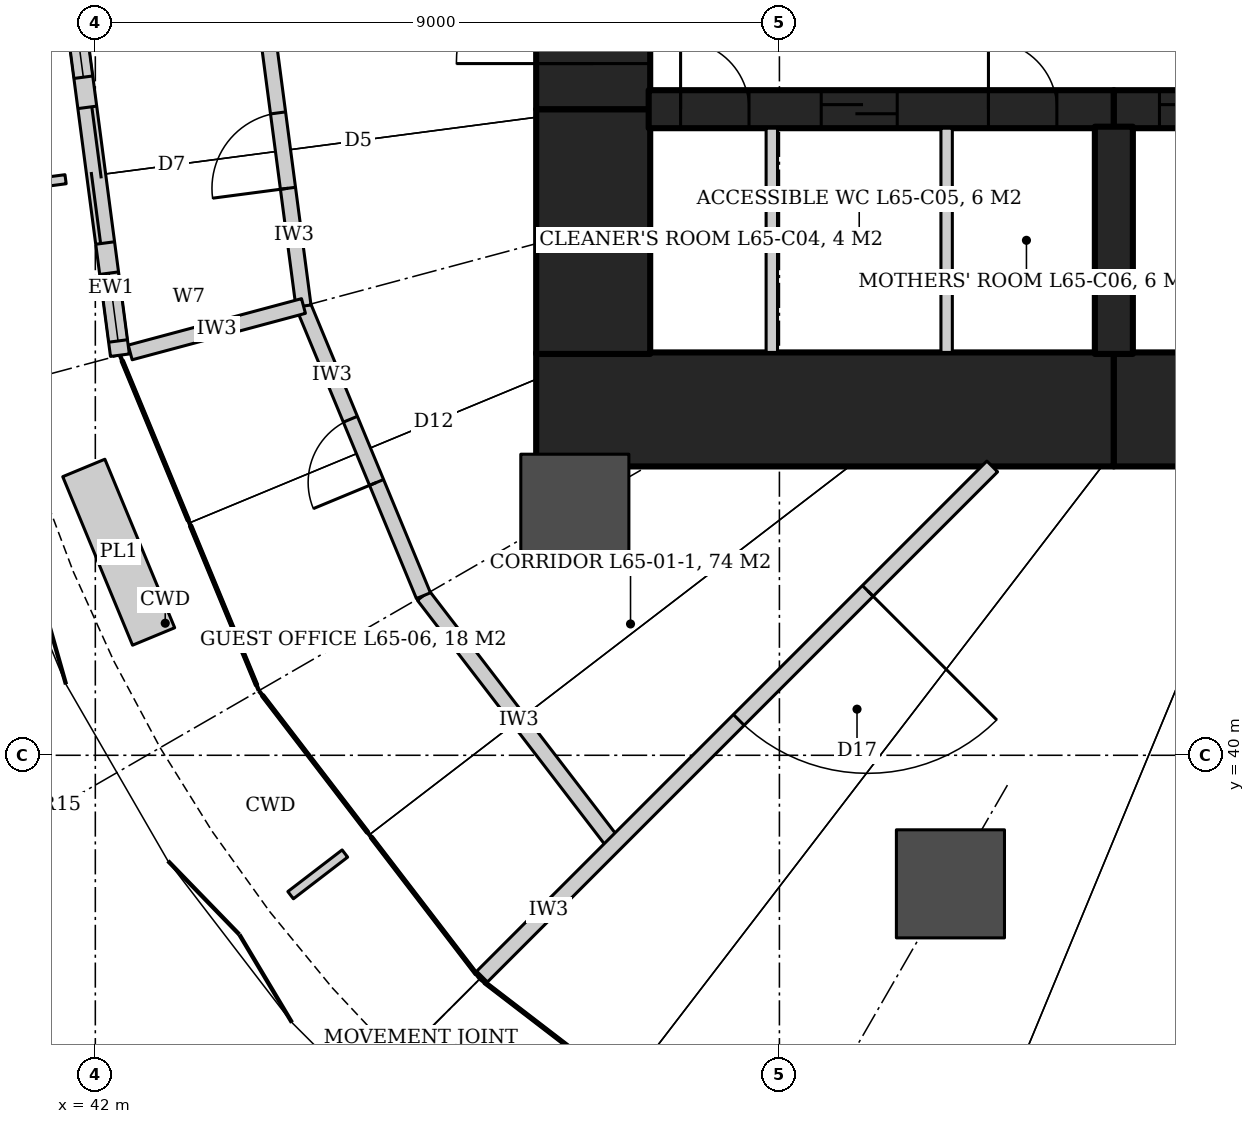
"""IFC4 building model, lengths in metres.
Left out: names, types, materials, properties, quantities, classifications, styles, units other than length and angle.
Written with IfcOpenShell. Run it as: python <this file> out.ifc"""

import sys

from ifc_helpers import new_model, si_unit, direction, frame, frame_2d, origin, origin_2d, place, context, subcontext, project, spatial, rectangle, hollow_circle, extrude, element, fill, save


model = new_model("IFC4")
c1 = context("Model", 3, precision=1e-05, world=origin(), true_north=direction((0.0, 1.0)))
c2 = subcontext(c1, "Body", "Model", "MODEL_VIEW")
j1 = project(units=[si_unit("LENGTHUNIT", "METRE"), si_unit("PLANEANGLEUNIT", "RADIAN")], contexts=[c1])
p1 = place(None, origin())
s1 = spatial("IfcSite", under=j1, at=p1, CompositionType="ELEMENT")
p2 = place(p1, origin())
s2 = spatial("IfcBuilding", under=s1, at=p2, CompositionType="ELEMENT")
p3 = place(p2, frame((0.0, 0.0, 278.0)))
s3 = spatial("IfcBuildingStorey", under=s2, at=p3, CompositionType="ELEMENT", Elevation=278.0)
p4 = place(p3, frame((47.8, 44.55, 0.0), z_axis=(0.0, 0.0, 1.0), x_axis=(1.0, 0.0, 0.0)))
e1 = element("IfcWall", 1, at=p4, inside=s3, PredefinedType="SHEAR", context=c2, shape_type="SweptSolid", body=[
    extrude(rectangle(XDim=7.6, YDim=1.5, at=frame_2d((3.8, 0.0))), origin(), (0.0, 0.0, 1.0), 4.2),
])
p5 = place(p3, frame((55.4, 44.55, 0.0), z_axis=(0.0, 0.0, 1.0), x_axis=(1.0, 0.0, 0.0)))
e2 = element("IfcWall", 2, at=p5, inside=s3, PredefinedType="SHEAR", context=c2, shape_type="SweptSolid", body=[
    extrude(rectangle(XDim=9.2, YDim=1.5, at=frame_2d((4.6, 0.0))), origin(), (0.0, 0.0, 1.0), 4.2),
])
p6 = place(p3, frame((48.55, 45.28, 0.0), z_axis=(0.0, 0.0, 1.0), x_axis=(0.0, 1.0, 0.0)))
e3 = element("IfcWall", 3, at=p6, inside=s3, PredefinedType="SHEAR", context=c2, shape_type="SweptSolid", body=[
    extrude(rectangle(XDim=3.22, YDim=1.5, at=frame_2d((1.61, 0.0))), origin(), (0.0, 0.0, 1.0), 4.2),
])
p7 = place(p3, frame((48.55, 48.5, 0.0), z_axis=(0.0, 0.0, 1.0), x_axis=(0.0, 1.0, 0.0)))
e4 = element("IfcWall", 4, at=p7, inside=s3, PredefinedType="SHEAR", context=c2, shape_type="SweptSolid", body=[
    extrude(rectangle(XDim=3.0, YDim=1.5, at=frame_2d((1.5, 0.0))), origin(), (0.0, 0.0, 1.0), 4.2),
])
p8 = place(p7, frame((0.6, 0.0, 0.0)))
e5 = element("IfcOpeningElement", 5, at=p8, cuts=e4, PredefinedType="OPENING", context=c2, shape_type="SweptSolid", body=[
    extrude(rectangle(XDim=1.8, YDim=2.1, at=frame_2d((0.9, 1.05))), frame((0.0, 0.76, 0.0), z_axis=(0.0, -1.0, 0.0), x_axis=(1.0, 0.0, 0.0)), (0.0, 0.0, 1.0), 1.52),
])
p9 = place(p3, frame((49.28, 48.5, 0.0), z_axis=(0.0, 0.0, 1.0), x_axis=(1.0, 0.0, 0.0)))
e6 = element("IfcWall", 6, at=p9, inside=s3, PredefinedType="SHEAR", context=c2, shape_type="SweptSolid", body=[
    extrude(rectangle(XDim=6.12, YDim=0.5, at=frame_2d((3.06, 0.0))), origin(), (0.0, 0.0, 1.0), 4.2),
])
p10 = place(p9, frame((0.42, 0.0, 0.0)))
e7 = element("IfcOpeningElement", 7, at=p10, cuts=e6, PredefinedType="OPENING", context=c2, shape_type="SweptSolid", body=[
    extrude(rectangle(XDim=0.9, YDim=2.1, at=frame_2d((0.45, 1.05))), frame((0.0, 0.26, 0.0), z_axis=(0.0, -1.0, 0.0), x_axis=(1.0, 0.0, 0.0)), (0.0, 0.0, 1.0), 0.52),
])
p11 = place(p9, frame((2.27, 0.0, 0.0)))
e8 = element("IfcOpeningElement", 8, at=p11, cuts=e6, PredefinedType="OPENING", context=c2, shape_type="SweptSolid", body=[
    extrude(rectangle(XDim=1.0, YDim=2.1, at=frame_2d((0.5, 1.05))), frame((0.0, 0.26, 0.0), z_axis=(0.0, -1.0, 0.0), x_axis=(1.0, 0.0, 0.0)), (0.0, 0.0, 1.0), 0.52),
])
p12 = place(p9, frame((4.47, 0.0, 0.0)))
e9 = element("IfcOpeningElement", 9, at=p12, cuts=e6, PredefinedType="OPENING", context=c2, shape_type="SweptSolid", body=[
    extrude(rectangle(XDim=0.9, YDim=2.1, at=frame_2d((0.45, 1.05))), frame((0.0, 0.26, 0.0), z_axis=(0.0, -1.0, 0.0), x_axis=(1.0, 0.0, 0.0)), (0.0, 0.0, 1.0), 0.52),
])
p13 = place(p3, frame((55.4, 48.5, 0.0), z_axis=(0.0, 0.0, 1.0), x_axis=(1.0, 0.0, 0.0)))
e10 = element("IfcWall", 10, at=p13, inside=s3, PredefinedType="SHEAR", context=c2, shape_type="SweptSolid", body=[
    extrude(rectangle(XDim=9.2, YDim=0.5, at=frame_2d((4.6, 0.0))), origin(), (0.0, 0.0, 1.0), 4.2),
])
p14 = place(p13, frame((0.6, 0.0, 0.0)))
e11 = element("IfcOpeningElement", 11, at=p14, cuts=e10, PredefinedType="OPENING", context=c2, shape_type="SweptSolid", body=[
    extrude(rectangle(XDim=1.1, YDim=2.1, at=frame_2d((0.55, 1.05))), frame((0.0, 0.26, 0.0), z_axis=(0.0, -1.0, 0.0), x_axis=(1.0, 0.0, 0.0)), (0.0, 0.0, 1.0), 0.52),
])
p15 = place(p13, frame((2.9, 0.0, 0.0)))
e12 = element("IfcOpeningElement", 12, at=p15, cuts=e10, PredefinedType="OPENING", context=c2, shape_type="SweptSolid", body=[
    extrude(rectangle(XDim=1.1, YDim=2.1, at=frame_2d((0.55, 1.05))), frame((0.0, 0.26, 0.0), z_axis=(0.0, -1.0, 0.0), x_axis=(1.0, 0.0, 0.0)), (0.0, 0.0, 1.0), 0.52),
])
p16 = place(p13, frame((5.2, 0.0, 0.0)))
e13 = element("IfcOpeningElement", 13, at=p16, cuts=e10, PredefinedType="OPENING", context=c2, shape_type="SweptSolid", body=[
    extrude(rectangle(XDim=1.1, YDim=2.1, at=frame_2d((0.55, 1.05))), frame((0.0, 0.26, 0.0), z_axis=(0.0, -1.0, 0.0), x_axis=(1.0, 0.0, 0.0)), (0.0, 0.0, 1.0), 0.52),
])
p17 = place(p13, frame((7.5, 0.0, 0.0)))
e14 = element("IfcOpeningElement", 14, at=p17, cuts=e10, PredefinedType="OPENING", context=c2, shape_type="SweptSolid", body=[
    extrude(rectangle(XDim=1.1, YDim=2.1, at=frame_2d((0.55, 1.05))), frame((0.0, 0.26, 0.0), z_axis=(0.0, -1.0, 0.0), x_axis=(1.0, 0.0, 0.0)), (0.0, 0.0, 1.0), 0.52),
])
p18 = place(p3, frame((55.4, 48.27, 0.0), z_axis=(0.0, 0.0, 1.0), x_axis=(0.0, -1.0, 0.0)))
e15 = element("IfcWall", 15, at=p18, inside=s3, PredefinedType="SHEAR", context=c2, shape_type="SweptSolid", body=[
    extrude(rectangle(XDim=2.99, YDim=0.5, at=frame_2d((1.495, 0.0))), origin(), (0.0, 0.0, 1.0), 4.2),
])
for number, where, z_axis, x_axis in (
    (16, (48.309, 43.25, 0.0), (0.0, 0.0, 1.0), (1.0, 0.0, 0.0)),
    (17, (53.25, 38.309, 0.0), (0.0, 0.0, 1.0), (1.0, 0.0, 0.0)),
):
    element("IfcColumn", number, at=place(p3, frame(where, z_axis=z_axis, x_axis=x_axis)), inside=s3, PredefinedType="COLUMN", context=c2, shape_type="SweptSolid", body=[
        extrude(hollow_circle(Radius=0.711, WallThickness=0.07, at=origin_2d()), origin(), (0.0, 0.0, 1.0), 4.2),
    ])
p19 = place(p3, frame((48.828, 38.828, 0.0), z_axis=(0.0, 0.0, 1.0), x_axis=(-0.608714823874, 0.793389099494, 0.0)))
e18 = element("IfcWall", 18, at=p19, inside=s3, PredefinedType="PARTITIONING", context=c2, shape_type="SweptSolid", body=[
    extrude(rectangle(XDim=4.125, YDim=0.2, at=frame_2d((2.062, 0.0))), origin(), (0.0, 0.0, 1.0), 3.02),
])
p20 = place(p3, frame((46.317, 42.1, 0.0), z_axis=(0.0, 0.0, 1.0), x_axis=(-0.382731667114, 0.923859551549, 0.0)))
e19 = element("IfcWall", 19, at=p20, inside=s3, PredefinedType="PARTITIONING", context=c2, shape_type="SweptSolid", body=[
    extrude(rectangle(XDim=4.125, YDim=0.2, at=frame_2d((2.062, 0.0))), origin(), (0.0, 0.0, 1.0), 3.02),
])
p21 = place(p20, frame((1.612, 0.0, 0.0)))
e20 = element("IfcOpeningElement", 20, at=p21, cuts=e19, PredefinedType="OPENING", context=c2, shape_type="SweptSolid", body=[
    extrude(rectangle(XDim=0.9, YDim=2.4, at=frame_2d((0.45, 1.2))), frame((0.0, 0.11, 0.0), z_axis=(0.0, -1.0, 0.0), x_axis=(1.0, 0.0, 0.0)), (0.0, 0.0, 1.0), 0.22),
])
p22 = place(p3, frame((44.738, 45.911, 0.0), z_axis=(0.0, 0.0, 1.0), x_axis=(-0.130515758099, 0.991446234996, 0.0)))
e21 = element("IfcWall", 21, at=p22, inside=s3, PredefinedType="PARTITIONING", context=c2, shape_type="SweptSolid", body=[
    extrude(rectangle(XDim=4.125, YDim=0.2, at=frame_2d((2.062, 0.0))), origin(), (0.0, 0.0, 1.0), 3.02),
])
p23 = place(p22, frame((1.562, 0.0, 0.0)))
e22 = element("IfcOpeningElement", 22, at=p23, cuts=e21, PredefinedType="OPENING", context=c2, shape_type="SweptSolid", body=[
    extrude(rectangle(XDim=1.0, YDim=2.1, at=frame_2d((0.5, 1.05))), frame((0.0, 0.11, 0.0), z_axis=(0.0, -1.0, 0.0), x_axis=(1.0, 0.0, 0.0)), (0.0, 0.0, 1.0), 0.22),
])
p24 = place(p3, frame((44.738, 45.911, 0.0), z_axis=(0.0, 0.0, 1.0), x_axis=(-0.965920805306, -0.258837782939, 0.0)))
e23 = element("IfcWall", 23, at=p24, inside=s3, PredefinedType="PARTITIONING", context=c2, shape_type="SweptSolid", body=[
    extrude(rectangle(XDim=2.56, YDim=0.2, at=frame_2d((1.28, 0.0))), origin(), (0.0, 0.0, 1.0), 3.02),
])
p25 = place(p3, frame((53.8, 43.8, 0.0), z_axis=(0.0, 0.0, 1.0), x_axis=(-0.707106781187, -0.707106781187, 0.0)))
e24 = element("IfcWall", 24, at=p25, inside=s3, PredefinedType="PARTITIONING", context=c2, shape_type="SweptSolid", body=[
    extrude(rectangle(XDim=9.692, YDim=0.2, at=frame_2d((4.846, 0.0))), origin(), (0.0, 0.0, 1.0), 3.02),
])
p26 = place(p25, frame((2.316, 0.0, 0.0)))
e25 = element("IfcOpeningElement", 25, at=p26, cuts=e24, PredefinedType="OPENING", context=c2, shape_type="SweptSolid", body=[
    extrude(rectangle(XDim=2.4, YDim=2.4, at=frame_2d((1.2, 1.2))), frame((0.0, 0.11, 0.0), z_axis=(0.0, -1.0, 0.0), x_axis=(1.0, 0.0, 0.0)), (0.0, 0.0, 1.0), 0.22),
])
p27 = place(p3, frame((41.5, 50.0, 0.0), z_axis=(0.0, 0.0, 1.0), x_axis=(0.130527743461, -0.991444657148, 0.0)))
e26 = element("IfcWall", 26, at=p27, inside=s3, PredefinedType="SOLIDWALL", context=c2, shape_type="SweptSolid", body=[
    extrude(rectangle(XDim=4.829, YDim=0.25, at=frame_2d((2.415, 0.0))), origin(), (0.0, 0.0, 1.0), 4.04),
])
p28 = place(p27, frame((1.515, 0.0, 0.0)))
e27 = element("IfcOpeningElement", 27, at=p28, cuts=e26, PredefinedType="OPENING", context=c2, shape_type="SweptSolid", body=[
    extrude(rectangle(XDim=1.8, YDim=2.4, at=frame_2d((0.9, 1.2))), frame((0.0, 0.135, 0.0), z_axis=(0.0, -1.0, 0.0), x_axis=(1.0, 0.0, 0.0)), (0.0, 0.0, 1.0), 0.27),
])
p29 = place(p27, frame((0.215, 0.0, 0.0)))
e28 = element("IfcOpeningElement", 28, at=p29, cuts=e26, PredefinedType="OPENING", context=c2, shape_type="SweptSolid", body=[
    extrude(rectangle(XDim=0.9, YDim=2.4, at=frame_2d((0.45, 1.2))), frame((0.0, 0.135, 0.0), z_axis=(0.0, -1.0, 0.0), x_axis=(1.0, 0.0, 0.0)), (0.0, 0.0, 1.0), 0.27),
])
p30 = place(p27, frame((3.715, 0.0, 0.0)))
e29 = element("IfcOpeningElement", 29, at=p30, cuts=e26, PredefinedType="OPENING", context=c2, shape_type="SweptSolid", body=[
    extrude(rectangle(XDim=0.9, YDim=2.4, at=frame_2d((0.45, 1.2))), frame((0.0, 0.135, 0.0), z_axis=(0.0, -1.0, 0.0), x_axis=(1.0, 0.0, 0.0)), (0.0, 0.0, 1.0), 0.27),
])
for number, where, z_axis, x_axis in (
    (30, (50.9, 45.3, 0.0), (0.0, 0.0, 1.0), (0.0, 1.0, 0.0)),
    (31, (53.2, 45.3, 0.0), (0.0, 0.0, 1.0), (0.0, 1.0, 0.0)),
):
    element("IfcWall", number, at=place(p3, frame(where, z_axis=z_axis, x_axis=x_axis)), inside=s3, PredefinedType="PARTITIONING", context=c2, shape_type="SweptSolid", body=[
        extrude(rectangle(XDim=2.95, YDim=0.15, at=frame_2d((1.475, 0.0))), origin(), (0.0, 0.0, 1.0), 4.04),
    ])
p31 = place(p23, origin())
e32 = element("IfcDoor", 32, at=p31, inside=s3, OperationType="SINGLE_SWING_LEFT", PredefinedType="DOOR", context=c2, shape_type="SweptSolid", body=[
    extrude(rectangle(XDim=1.0, YDim=2.1, at=frame_2d((0.5, 1.05))), frame((0.0, 0.025, 0.0), z_axis=(0.0, -1.0, 0.0), x_axis=(1.0, 0.0, 0.0)), (0.0, 0.0, 1.0), 0.05),
])
fill(e22, e32)
p32 = place(p21, origin())
e33 = element("IfcDoor", 33, at=p32, inside=s3, OperationType="SINGLE_SWING_LEFT", PredefinedType="DOOR", context=c2, shape_type="SweptSolid", body=[
    extrude(rectangle(XDim=0.9, YDim=2.4, at=frame_2d((0.45, 1.2))), frame((0.0, 0.025, 0.0), z_axis=(0.0, -1.0, 0.0), x_axis=(1.0, 0.0, 0.0)), (0.0, 0.0, 1.0), 0.05),
])
fill(e20, e33)
p33 = place(p26, origin())
e34 = element("IfcDoor", 34, at=p33, inside=s3, OperationType="DOUBLE_DOOR_DOUBLE_SWING", PredefinedType="DOOR", context=c2, shape_type="SweptSolid", body=[
    extrude(rectangle(XDim=2.4, YDim=2.4, at=frame_2d((1.2, 1.2))), frame((0.0, 0.025, 0.0), z_axis=(0.0, -1.0, 0.0), x_axis=(1.0, 0.0, 0.0)), (0.0, 0.0, 1.0), 0.05),
])
fill(e25, e34)
p34 = place(p28, origin())
e35 = element("IfcDoor", 35, at=p34, inside=s3, OperationType="DOUBLE_DOOR_SLIDING", PredefinedType="DOOR", context=c2, shape_type="SweptSolid", body=[
    extrude(rectangle(XDim=1.8, YDim=2.4, at=frame_2d((0.9, 1.2))), frame((0.0, 0.025, 0.0), z_axis=(0.0, -1.0, 0.0), x_axis=(1.0, 0.0, 0.0)), (0.0, 0.0, 1.0), 0.05),
])
fill(e27, e35)
p35 = place(p29, origin())
e36 = element("IfcWindow", 36, at=p35, inside=s3, PartitioningType="SINGLE_PANEL", PredefinedType="WINDOW", context=c2, shape_type="SweptSolid", body=[
    extrude(rectangle(XDim=0.9, YDim=2.4, at=frame_2d((0.45, 1.2))), frame((0.0, 0.03, 0.0), z_axis=(0.0, -1.0, 0.0), x_axis=(1.0, 0.0, 0.0)), (0.0, 0.0, 1.0), 0.06),
])
fill(e28, e36)
p36 = place(p30, origin())
e37 = element("IfcWindow", 37, at=p36, inside=s3, PartitioningType="SINGLE_PANEL", PredefinedType="WINDOW", context=c2, shape_type="SweptSolid", body=[
    extrude(rectangle(XDim=0.9, YDim=2.4, at=frame_2d((0.45, 1.2))), frame((0.0, 0.03, 0.0), z_axis=(0.0, -1.0, 0.0), x_axis=(1.0, 0.0, 0.0)), (0.0, 0.0, 1.0), 0.06),
])
fill(e29, e37)
p37 = place(p14, origin())
e38 = element("IfcDoor", 38, at=p37, inside=s3, OperationType="SLIDING_TO_LEFT", PredefinedType="DOOR", context=c2, shape_type="SweptSolid", body=[
    extrude(rectangle(XDim=1.1, YDim=2.1, at=frame_2d((0.55, 1.05))), frame((0.0, 0.025, 0.0), z_axis=(0.0, -1.0, 0.0), x_axis=(1.0, 0.0, 0.0)), (0.0, 0.0, 1.0), 0.05),
])
fill(e11, e38)
p38 = place(p10, origin())
e39 = element("IfcDoor", 39, at=p38, inside=s3, OperationType="SINGLE_SWING_RIGHT", PredefinedType="DOOR", context=c2, shape_type="SweptSolid", body=[
    extrude(rectangle(XDim=0.9, YDim=2.1, at=frame_2d((0.45, 1.05))), frame((0.0, 0.025, 0.0), z_axis=(0.0, -1.0, 0.0), x_axis=(1.0, 0.0, 0.0)), (0.0, 0.0, 1.0), 0.05),
])
fill(e7, e39)
p39 = place(p11, origin())
e40 = element("IfcDoor", 40, at=p39, inside=s3, OperationType="SLIDING_TO_LEFT", PredefinedType="DOOR", context=c2, shape_type="SweptSolid", body=[
    extrude(rectangle(XDim=1.0, YDim=2.1, at=frame_2d((0.5, 1.05))), frame((0.0, 0.025, 0.0), z_axis=(0.0, -1.0, 0.0), x_axis=(1.0, 0.0, 0.0)), (0.0, 0.0, 1.0), 0.05),
])
fill(e8, e40)
p40 = place(p12, origin())
e41 = element("IfcDoor", 41, at=p40, inside=s3, OperationType="SINGLE_SWING_RIGHT", PredefinedType="DOOR", context=c2, shape_type="SweptSolid", body=[
    extrude(rectangle(XDim=0.9, YDim=2.1, at=frame_2d((0.45, 1.05))), frame((0.0, 0.025, 0.0), z_axis=(0.0, -1.0, 0.0), x_axis=(1.0, 0.0, 0.0)), (0.0, 0.0, 1.0), 0.05),
])
fill(e9, e41)
p41 = place(p8, origin())
e42 = element("IfcDoor", 42, at=p41, inside=s3, OperationType="DOUBLE_DOOR_DOUBLE_SWING", PredefinedType="DOOR", context=c2, shape_type="SweptSolid", body=[
    extrude(rectangle(XDim=1.8, YDim=2.1, at=frame_2d((0.9, 1.05))), frame((0.0, 0.025, 0.0), z_axis=(0.0, -1.0, 0.0), x_axis=(1.0, 0.0, 0.0)), (0.0, 0.0, 1.0), 0.05),
])
fill(e5, e42)
save(model, sys.argv[1])
